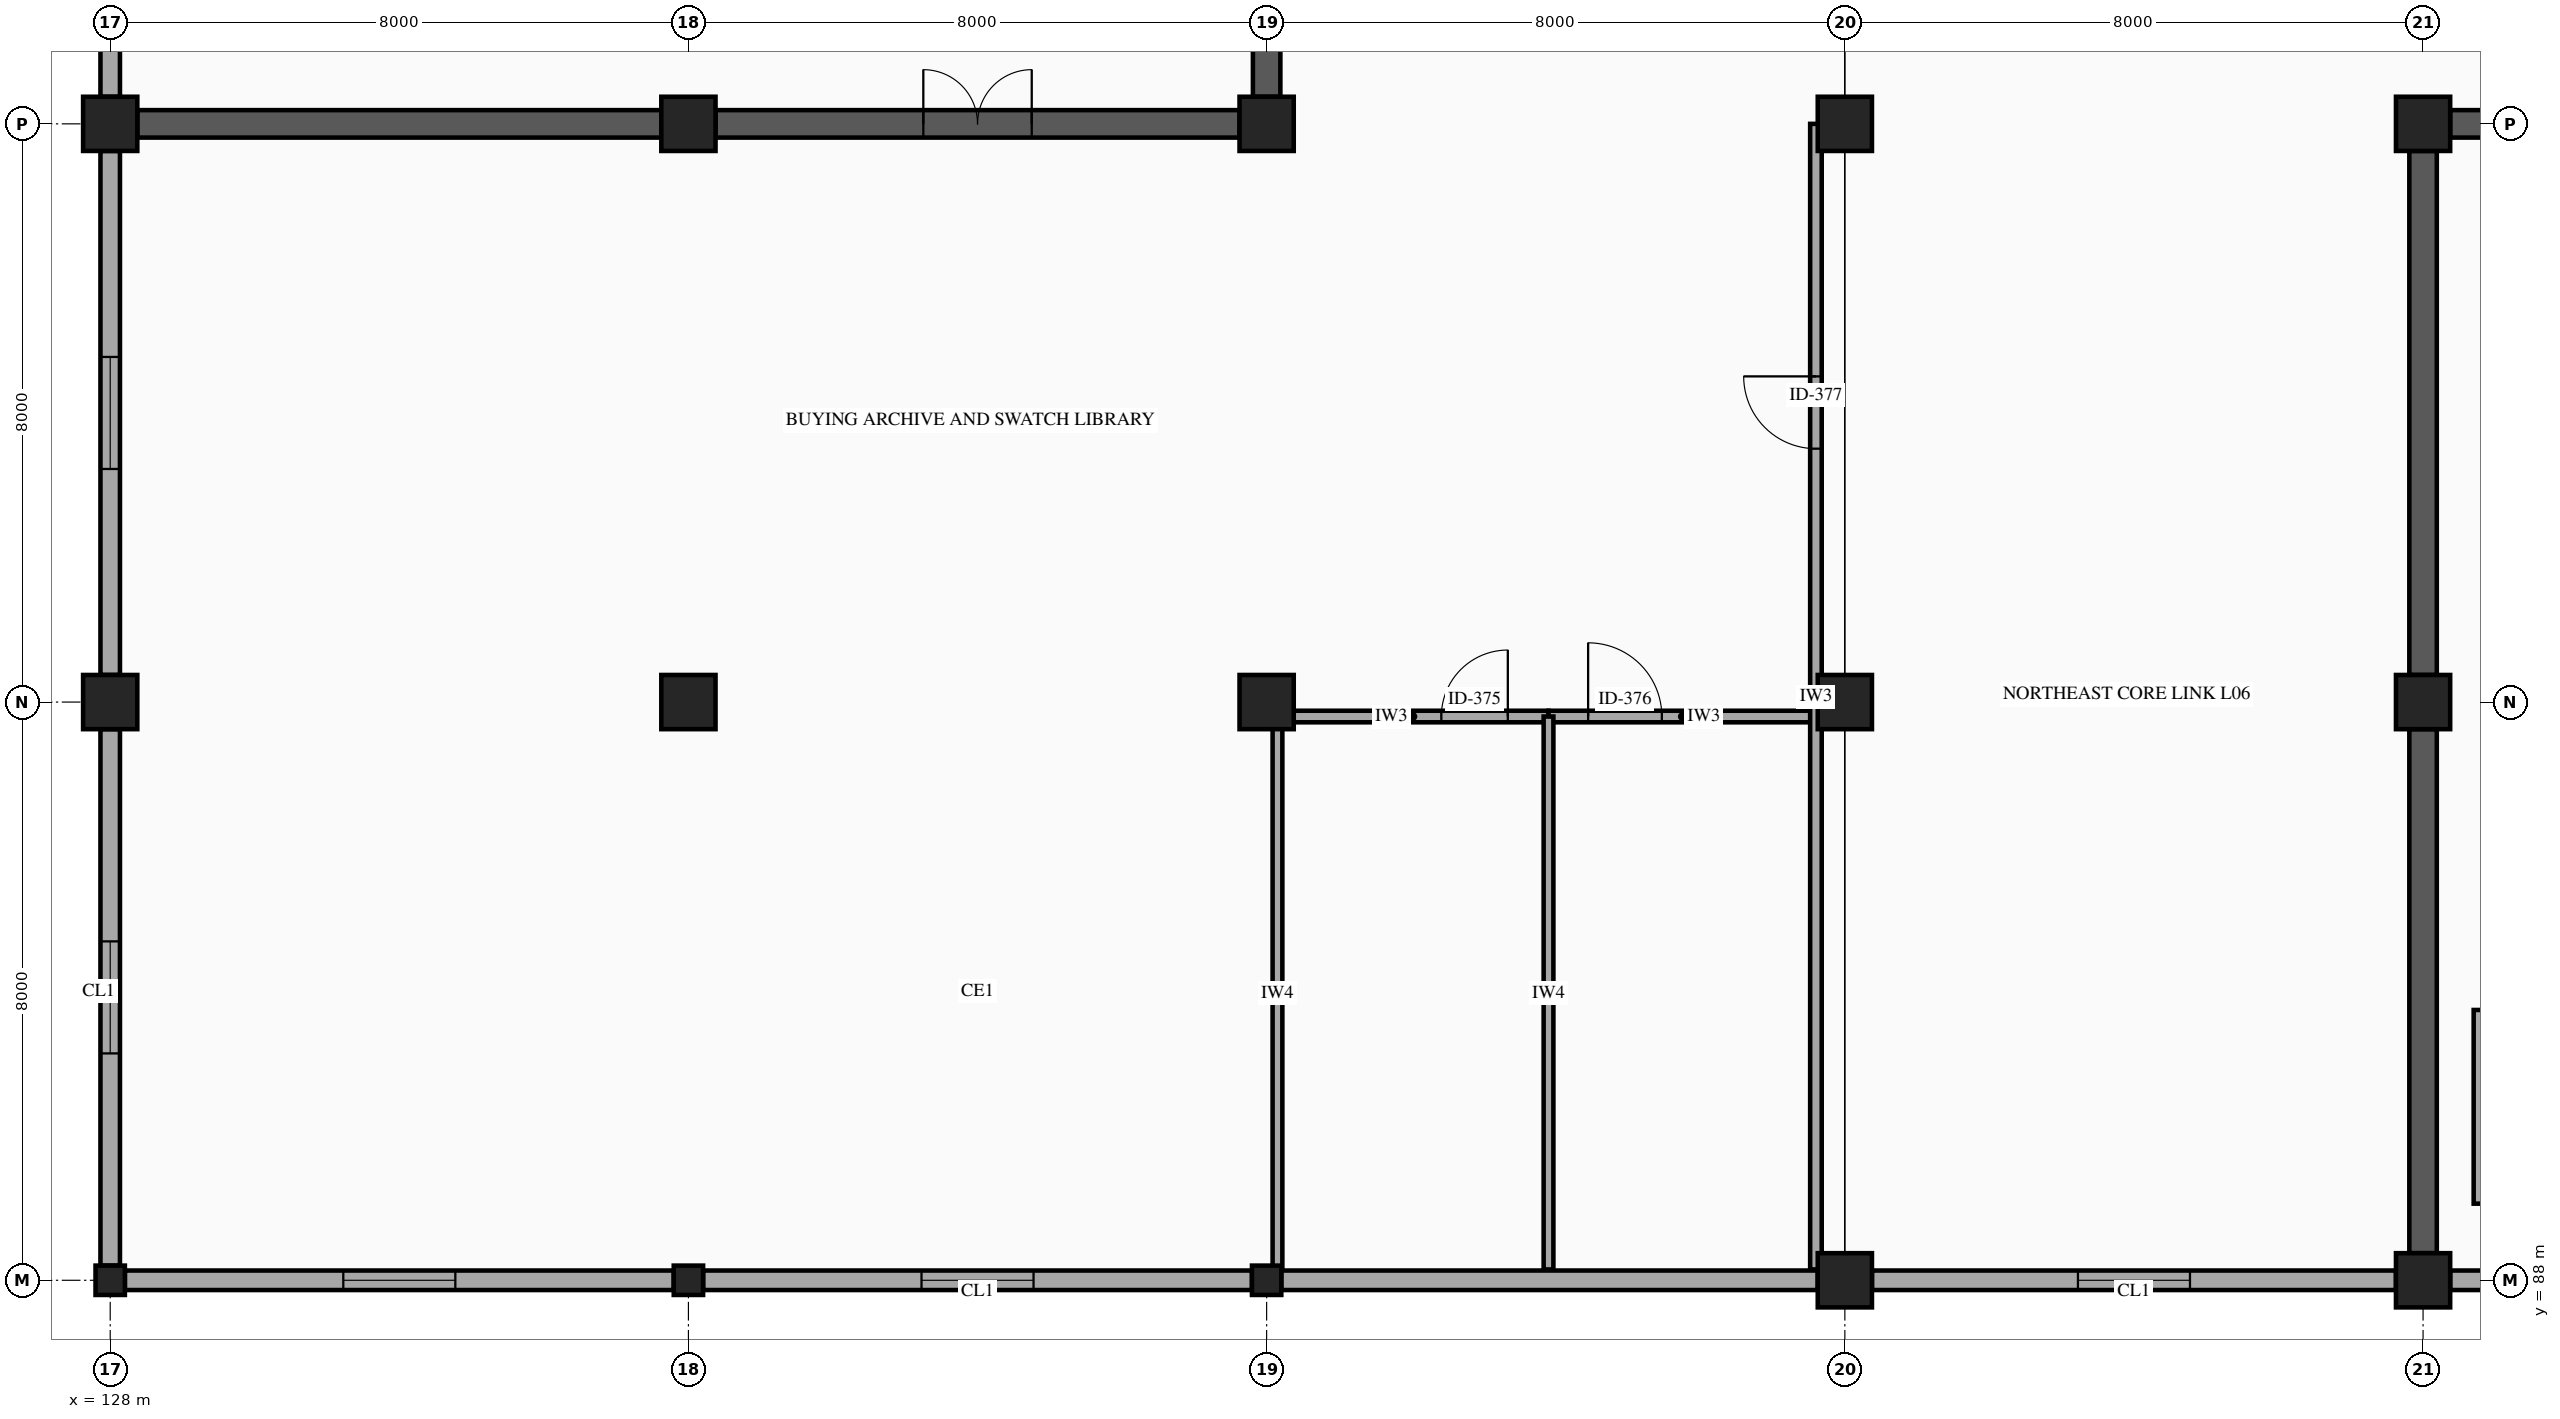
"""IFC4 building model, lengths in metres.
Left out: names, types, materials, properties, quantities, classifications, styles, units other than length and angle.
Written with IfcOpenShell. Run it as: python <this file> out.ifc"""

import sys

from ifc_helpers import new_model, si_unit, direction, frame, frame_2d, origin, origin_2d, place, context, subcontext, project, spatial, rectangle, hollow_circle, extrude, element, fill, save


model = new_model("IFC4")
c1 = context("Model", 3, precision=1e-05, world=origin(), true_north=direction((0.0, 1.0)))
c2 = subcontext(c1, "Body", "Model", "MODEL_VIEW")
j1 = project(units=[si_unit("LENGTHUNIT", "METRE"), si_unit("PLANEANGLEUNIT", "RADIAN")], contexts=[c1])
p1 = place(None, origin())
s1 = spatial("IfcSite", under=j1, at=p1, CompositionType="ELEMENT")
p2 = place(p1, origin())
s2 = spatial("IfcBuilding", under=s1, at=p2, CompositionType="ELEMENT")
p3 = place(p2, frame((0.0, 0.0, 28.4)))
s3 = spatial("IfcBuildingStorey", under=s2, at=p3, CompositionType="ELEMENT", Elevation=28.4)
p4 = place(p3, frame((128.0, 88.0, 0.0), z_axis=(0.0, 0.0, 1.0), x_axis=(1.0, 0.0, 0.0)))
e1 = element("IfcColumn", 1, at=p4, inside=s3, PredefinedType="COLUMN", context=c2, shape_type="SweptSolid", body=[
    extrude(hollow_circle(Radius=0.203, WallThickness=0.012, at=origin_2d()), origin(), (0.0, 0.0, 1.0), 4.5),
])
for number, where, z_axis, x_axis in (
    (2, (128.0, 96.0, 0.0), (0.0, 0.0, 1.0), (1.0, 0.0, 0.0)),
    (3, (128.0, 104.0, 0.0), (0.0, 0.0, 1.0), (1.0, 0.0, 0.0)),
):
    element("IfcColumn", number, at=place(p3, frame(where, z_axis=z_axis, x_axis=x_axis)), inside=s3, PredefinedType="COLUMN", context=c2, shape_type="SweptSolid", body=[
        extrude(rectangle(XDim=0.75, YDim=0.75, at=origin_2d()), origin(), (0.0, 0.0, 1.0), 4.5),
    ])
p5 = place(p3, frame((136.0, 88.0, 0.0), z_axis=(0.0, 0.0, 1.0), x_axis=(1.0, 0.0, 0.0)))
e4 = element("IfcColumn", 4, at=p5, inside=s3, PredefinedType="COLUMN", context=c2, shape_type="SweptSolid", body=[
    extrude(hollow_circle(Radius=0.203, WallThickness=0.012, at=origin_2d()), origin(), (0.0, 0.0, 1.0), 4.5),
])
for number, where, z_axis, x_axis in (
    (5, (136.0, 96.0, 0.0), (0.0, 0.0, 1.0), (1.0, 0.0, 0.0)),
    (6, (136.0, 104.0, 0.0), (0.0, 0.0, 1.0), (1.0, 0.0, 0.0)),
):
    element("IfcColumn", number, at=place(p3, frame(where, z_axis=z_axis, x_axis=x_axis)), inside=s3, PredefinedType="COLUMN", context=c2, shape_type="SweptSolid", body=[
        extrude(rectangle(XDim=0.75, YDim=0.75, at=origin_2d()), origin(), (0.0, 0.0, 1.0), 4.5),
    ])
p6 = place(p3, frame((144.0, 88.0, 0.0), z_axis=(0.0, 0.0, 1.0), x_axis=(1.0, 0.0, 0.0)))
e7 = element("IfcColumn", 7, at=p6, inside=s3, PredefinedType="COLUMN", context=c2, shape_type="SweptSolid", body=[
    extrude(hollow_circle(Radius=0.203, WallThickness=0.012, at=origin_2d()), origin(), (0.0, 0.0, 1.0), 4.5),
])
for number, where, z_axis, x_axis in (
    (8, (144.0, 96.0, 0.0), (0.0, 0.0, 1.0), (1.0, 0.0, 0.0)),
    (9, (144.0, 104.0, 0.0), (0.0, 0.0, 1.0), (1.0, 0.0, 0.0)),
    (10, (152.0, 88.0, 0.0), (0.0, 0.0, 1.0), (1.0, 0.0, 0.0)),
    (11, (152.0, 96.0, 0.0), (0.0, 0.0, 1.0), (1.0, 0.0, 0.0)),
    (12, (152.0, 104.0, 0.0), (0.0, 0.0, 1.0), (1.0, 0.0, 0.0)),
    (13, (160.0, 88.0, 0.0), (0.0, 0.0, 1.0), (1.0, 0.0, 0.0)),
    (14, (160.0, 96.0, 0.0), (0.0, 0.0, 1.0), (1.0, 0.0, 0.0)),
    (15, (160.0, 104.0, 0.0), (0.0, 0.0, 1.0), (1.0, 0.0, 0.0)),
):
    element("IfcColumn", number, at=place(p3, frame(where, z_axis=z_axis, x_axis=x_axis)), inside=s3, PredefinedType="COLUMN", context=c2, shape_type="SweptSolid", body=[
        extrude(rectangle(XDim=0.75, YDim=0.75, at=origin_2d()), origin(), (0.0, 0.0, 1.0), 4.5),
    ])
p7 = place(p3, frame((167.625, 88.0, 0.0), z_axis=(0.0, 0.0, 1.0), x_axis=(-1.0, 0.0, 0.0)))
e16 = element("IfcWall", 16, at=p7, inside=s3, PredefinedType="STANDARD", context=c2, shape_type="SweptSolid", body=[
    extrude(rectangle(XDim=7.25, YDim=0.27, at=frame_2d((3.625, 0.0))), origin(), (0.0, 0.0, 1.0), 3.48),
])
p8 = place(p3, frame((159.625, 88.0, 0.0), z_axis=(0.0, 0.0, 1.0), x_axis=(-1.0, 0.0, 0.0)))
e17 = element("IfcWall", 17, at=p8, inside=s3, PredefinedType="STANDARD", context=c2, shape_type="SweptSolid", body=[
    extrude(rectangle(XDim=7.25, YDim=0.27, at=frame_2d((3.625, 0.0))), origin(), (0.0, 0.0, 1.0), 3.48),
])
p9 = place(p8, frame((2.85, 0.0, 0.8)))
e18 = element("IfcOpeningElement", 18, at=p9, cuts=e17, PredefinedType="OPENING", context=c2, shape_type="SweptSolid", body=[
    extrude(rectangle(XDim=1.55, YDim=1.4, at=frame_2d((0.775, 0.7))), frame((0.0, 0.145, 0.0), z_axis=(0.0, -1.0, 0.0), x_axis=(1.0, 0.0, 0.0)), (0.0, 0.0, 1.0), 0.29),
])
p10 = place(p3, frame((151.625, 88.0, 0.0), z_axis=(0.0, 0.0, 1.0), x_axis=(-1.0, 0.0, 0.0)))
e19 = element("IfcWall", 19, at=p10, inside=s3, PredefinedType="STANDARD", context=c2, shape_type="SweptSolid", body=[
    extrude(rectangle(XDim=7.422, YDim=0.27, at=frame_2d((3.711, 0.0))), origin(), (0.0, 0.0, 1.0), 3.48),
])
p11 = place(p3, frame((143.797, 88.0, 0.0), z_axis=(0.0, 0.0, 1.0), x_axis=(-1.0, 0.0, 0.0)))
e20 = element("IfcWall", 20, at=p11, inside=s3, PredefinedType="STANDARD", context=c2, shape_type="SweptSolid", body=[
    extrude(rectangle(XDim=7.594, YDim=0.27, at=frame_2d((3.797, 0.0))), origin(), (0.0, 0.0, 1.0), 3.48),
])
p12 = place(p11, frame((3.022, 0.0, 0.8)))
e21 = element("IfcOpeningElement", 21, at=p12, cuts=e20, PredefinedType="OPENING", context=c2, shape_type="SweptSolid", body=[
    extrude(rectangle(XDim=1.55, YDim=1.4, at=frame_2d((0.775, 0.7))), frame((0.0, 0.145, 0.0), z_axis=(0.0, -1.0, 0.0), x_axis=(1.0, 0.0, 0.0)), (0.0, 0.0, 1.0), 0.29),
])
p13 = place(p3, frame((135.797, 88.0, 0.0), z_axis=(0.0, 0.0, 1.0), x_axis=(-1.0, 0.0, 0.0)))
e22 = element("IfcWall", 22, at=p13, inside=s3, PredefinedType="STANDARD", context=c2, shape_type="SweptSolid", body=[
    extrude(rectangle(XDim=7.594, YDim=0.27, at=frame_2d((3.797, 0.0))), origin(), (0.0, 0.0, 1.0), 3.48),
])
p14 = place(p13, frame((3.022, 0.0, 0.8)))
e23 = element("IfcOpeningElement", 23, at=p14, cuts=e22, PredefinedType="OPENING", context=c2, shape_type="SweptSolid", body=[
    extrude(rectangle(XDim=1.55, YDim=1.4, at=frame_2d((0.775, 0.7))), frame((0.0, 0.145, 0.0), z_axis=(0.0, -1.0, 0.0), x_axis=(1.0, 0.0, 0.0)), (0.0, 0.0, 1.0), 0.29),
])
p15 = place(p3, frame((128.0, 88.203, 0.0), z_axis=(0.0, 0.0, 1.0), x_axis=(0.0, 1.0, 0.0)))
e24 = element("IfcWall", 24, at=p15, inside=s3, PredefinedType="STANDARD", context=c2, shape_type="SweptSolid", body=[
    extrude(rectangle(XDim=7.422, YDim=0.27, at=frame_2d((3.711, 0.0))), origin(), (0.0, 0.0, 1.0), 3.48),
])
p16 = place(p15, frame((2.936, 0.0, 0.8)))
e25 = element("IfcOpeningElement", 25, at=p16, cuts=e24, PredefinedType="OPENING", context=c2, shape_type="SweptSolid", body=[
    extrude(rectangle(XDim=1.55, YDim=1.4, at=frame_2d((0.775, 0.7))), frame((0.0, 0.145, 0.0), z_axis=(0.0, -1.0, 0.0), x_axis=(1.0, 0.0, 0.0)), (0.0, 0.0, 1.0), 0.29),
])
p17 = place(p3, frame((128.0, 96.375, 0.0), z_axis=(0.0, 0.0, 1.0), x_axis=(0.0, 1.0, 0.0)))
e26 = element("IfcWall", 26, at=p17, inside=s3, PredefinedType="STANDARD", context=c2, shape_type="SweptSolid", body=[
    extrude(rectangle(XDim=7.25, YDim=0.27, at=frame_2d((3.625, 0.0))), origin(), (0.0, 0.0, 1.0), 3.48),
])
p18 = place(p17, frame((2.85, 0.0, 0.8)))
e27 = element("IfcOpeningElement", 27, at=p18, cuts=e26, PredefinedType="OPENING", context=c2, shape_type="SweptSolid", body=[
    extrude(rectangle(XDim=1.55, YDim=1.4, at=frame_2d((0.775, 0.7))), frame((0.0, 0.145, 0.0), z_axis=(0.0, -1.0, 0.0), x_axis=(1.0, 0.0, 0.0)), (0.0, 0.0, 1.0), 0.29),
])
p19 = place(p3, frame((128.0, 104.375, 0.0), z_axis=(0.0, 0.0, 1.0), x_axis=(0.0, 1.0, 0.0)))
e28 = element("IfcWall", 28, at=p19, inside=s3, PredefinedType="STANDARD", context=c2, shape_type="SweptSolid", body=[
    extrude(rectangle(XDim=7.25, YDim=0.27, at=frame_2d((3.625, 0.0))), origin(), (0.0, 0.0, 1.0), 3.48),
])
p20 = place(p3, frame((128.375, 104.0, 0.0), z_axis=(0.0, 0.0, 1.0), x_axis=(1.0, 0.0, 0.0)))
e29 = element("IfcWall", 29, at=p20, inside=s3, PredefinedType="SHEAR", context=c2, shape_type="SweptSolid", body=[
    extrude(rectangle(XDim=7.25, YDim=0.38, at=frame_2d((3.625, 0.0))), origin(), (0.0, 0.0, 1.0), 4.28),
])
p21 = place(p3, frame((136.375, 104.0, 0.0), z_axis=(0.0, 0.0, 1.0), x_axis=(1.0, 0.0, 0.0)))
e30 = element("IfcWall", 30, at=p21, inside=s3, PredefinedType="SHEAR", context=c2, shape_type="SweptSolid", body=[
    extrude(rectangle(XDim=7.25, YDim=0.38, at=frame_2d((3.625, 0.0))), origin(), (0.0, 0.0, 1.0), 4.28),
])
p22 = place(p21, frame((2.875, 0.0, 0.0)))
e31 = element("IfcOpeningElement", 31, at=p22, cuts=e30, PredefinedType="OPENING", context=c2, shape_type="SweptSolid", body=[
    extrude(rectangle(XDim=1.5, YDim=2.15, at=frame_2d((0.75, 1.075))), frame((0.0, 0.2, 0.0), z_axis=(0.0, -1.0, 0.0), x_axis=(1.0, 0.0, 0.0)), (0.0, 0.0, 1.0), 0.4),
])
p23 = place(p3, frame((144.0, 104.375, 0.0), z_axis=(0.0, 0.0, 1.0), x_axis=(0.0, 1.0, 0.0)))
e32 = element("IfcWall", 32, at=p23, inside=s3, PredefinedType="SHEAR", context=c2, shape_type="SweptSolid", body=[
    extrude(rectangle(XDim=7.25, YDim=0.38, at=frame_2d((3.625, 0.0))), origin(), (0.0, 0.0, 1.0), 4.28),
])
p24 = place(p23, frame((1.838, 0.0, 0.0)))
e33 = element("IfcOpeningElement", 33, at=p24, cuts=e32, PredefinedType="OPENING", context=c2, shape_type="SweptSolid", body=[
    extrude(rectangle(XDim=1.5, YDim=2.15, at=frame_2d((0.75, 1.075))), frame((0.0, 0.2, 0.0), z_axis=(0.0, -1.0, 0.0), x_axis=(1.0, 0.0, 0.0)), (0.0, 0.0, 1.0), 0.4),
])
for number, where, z_axis, x_axis in (
    (34, (160.375, 104.0, 0.0), (0.0, 0.0, 1.0), (1.0, 0.0, 0.0)),
    (35, (160.0, 88.375, 0.0), (0.0, 0.0, 1.0), (0.0, 1.0, 0.0)),
    (36, (160.0, 96.375, 0.0), (0.0, 0.0, 1.0), (0.0, 1.0, 0.0)),
):
    element("IfcWall", number, at=place(p3, frame(where, z_axis=z_axis, x_axis=x_axis)), inside=s3, PredefinedType="SHEAR", context=c2, shape_type="SweptSolid", body=[
        extrude(rectangle(XDim=7.25, YDim=0.38, at=frame_2d((3.625, 0.0))), origin(), (0.0, 0.0, 1.0), 4.28),
    ])
p25 = place(p3, frame((160.82, 89.06, 0.0), z_axis=(0.0, 0.0, 1.0), x_axis=(0.0, 1.0, 0.0)))
e37 = element("IfcWall", 37, at=p25, inside=s3, PredefinedType="PARTITIONING", context=c2, shape_type="SweptSolid", body=[
    extrude(rectangle(XDim=2.68, YDim=0.24, at=frame_2d((1.34, 0.0))), origin(), (0.0, 0.0, 1.0), 4.28),
])
p26 = place(p3, frame((144.15, 95.8, 0.0), z_axis=(0.0, 0.0, 1.0), x_axis=(1.0, 0.0, 0.0)))
e38 = element("IfcWall", 38, at=p26, inside=s3, PredefinedType="PARTITIONING", context=c2, shape_type="SweptSolid", body=[
    extrude(rectangle(XDim=3.75, YDim=0.16, at=frame_2d((1.875, 0.0))), origin(), (0.0, 0.0, 1.0), 3.48),
])
p27 = place(p26, frame((2.267, 0.0, 0.0)))
e39 = element("IfcOpeningElement", 39, at=p27, cuts=e38, PredefinedType="OPENING", context=c2, shape_type="SweptSolid", body=[
    extrude(rectangle(XDim=0.92, YDim=2.1, at=frame_2d((0.46, 1.05))), frame((0.0, 0.09, 0.0), z_axis=(0.0, -1.0, 0.0), x_axis=(1.0, 0.0, 0.0)), (0.0, 0.0, 1.0), 0.18),
])
p28 = place(p3, frame((147.9, 95.8, 0.0), z_axis=(0.0, 0.0, 1.0), x_axis=(1.0, 0.0, 0.0)))
e40 = element("IfcWall", 40, at=p28, inside=s3, PredefinedType="PARTITIONING", context=c2, shape_type="SweptSolid", body=[
    extrude(rectangle(XDim=3.7, YDim=0.16, at=frame_2d((1.85, 0.0))), origin(), (0.0, 0.0, 1.0), 3.48),
])
p29 = place(p28, frame((0.548, 0.0, 0.0)))
e41 = element("IfcOpeningElement", 41, at=p29, cuts=e40, PredefinedType="OPENING", context=c2, shape_type="SweptSolid", body=[
    extrude(rectangle(XDim=1.02, YDim=2.1, at=frame_2d((0.51, 1.05))), frame((0.0, 0.09, 0.0), z_axis=(0.0, -1.0, 0.0), x_axis=(1.0, 0.0, 0.0)), (0.0, 0.0, 1.0), 0.18),
])
for number, where, z_axis, x_axis in (
    (42, (144.15, 88.15, 0.0), (0.0, 0.0, 1.0), (0.0, 1.0, 0.0)),
    (43, (147.9, 88.15, 0.0), (0.0, 0.0, 1.0), (0.0, 1.0, 0.0)),
):
    element("IfcWall", number, at=place(p3, frame(where, z_axis=z_axis, x_axis=x_axis)), inside=s3, PredefinedType="PARTITIONING", context=c2, shape_type="SweptSolid", body=[
        extrude(rectangle(XDim=7.65, YDim=0.135, at=frame_2d((3.825, 0.0))), origin(), (0.0, 0.0, 1.0), 3.48),
    ])
p30 = place(p3, frame((151.6, 88.15, 0.0), z_axis=(0.0, 0.0, 1.0), x_axis=(0.0, 1.0, 0.0)))
e44 = element("IfcWall", 44, at=p30, inside=s3, PredefinedType="PARTITIONING", context=c2, shape_type="SweptSolid", body=[
    extrude(rectangle(XDim=15.85, YDim=0.16, at=frame_2d((7.925, 0.0))), origin(), (0.0, 0.0, 1.0), 3.48),
])
p31 = place(p30, frame((11.356, 0.0, 0.0)))
e45 = element("IfcOpeningElement", 45, at=p31, cuts=e44, PredefinedType="OPENING", context=c2, shape_type="SweptSolid", body=[
    extrude(rectangle(XDim=1.0, YDim=2.15, at=frame_2d((0.5, 1.075))), frame((0.0, 0.09, 0.0), z_axis=(0.0, -1.0, 0.0), x_axis=(1.0, 0.0, 0.0)), (0.0, 0.0, 1.0), 0.18),
])
p32 = place(p9, origin())
e46 = element("IfcWindow", 46, at=p32, inside=s3, PartitioningType="SINGLE_PANEL", PredefinedType="WINDOW", context=c2, shape_type="SweptSolid", body=[
    extrude(rectangle(XDim=1.55, YDim=1.4, at=frame_2d((0.775, 0.7))), frame((0.0, 0.03, 0.0), z_axis=(0.0, -1.0, 0.0), x_axis=(1.0, 0.0, 0.0)), (0.0, 0.0, 1.0), 0.06),
])
fill(e18, e46)
p33 = place(p12, origin())
e47 = element("IfcWindow", 47, at=p33, inside=s3, PartitioningType="SINGLE_PANEL", PredefinedType="WINDOW", context=c2, shape_type="SweptSolid", body=[
    extrude(rectangle(XDim=1.55, YDim=1.4, at=frame_2d((0.775, 0.7))), frame((0.0, 0.03, 0.0), z_axis=(0.0, -1.0, 0.0), x_axis=(1.0, 0.0, 0.0)), (0.0, 0.0, 1.0), 0.06),
])
fill(e21, e47)
p34 = place(p14, origin())
e48 = element("IfcWindow", 48, at=p34, inside=s3, PartitioningType="SINGLE_PANEL", PredefinedType="WINDOW", context=c2, shape_type="SweptSolid", body=[
    extrude(rectangle(XDim=1.55, YDim=1.4, at=frame_2d((0.775, 0.7))), frame((0.0, 0.03, 0.0), z_axis=(0.0, -1.0, 0.0), x_axis=(1.0, 0.0, 0.0)), (0.0, 0.0, 1.0), 0.06),
])
fill(e23, e48)
p35 = place(p16, origin())
e49 = element("IfcWindow", 49, at=p35, inside=s3, PartitioningType="SINGLE_PANEL", PredefinedType="WINDOW", context=c2, shape_type="SweptSolid", body=[
    extrude(rectangle(XDim=1.55, YDim=1.4, at=frame_2d((0.775, 0.7))), frame((0.0, 0.03, 0.0), z_axis=(0.0, -1.0, 0.0), x_axis=(1.0, 0.0, 0.0)), (0.0, 0.0, 1.0), 0.06),
])
fill(e25, e49)
p36 = place(p18, origin())
e50 = element("IfcWindow", 50, at=p36, inside=s3, PartitioningType="SINGLE_PANEL", PredefinedType="WINDOW", context=c2, shape_type="SweptSolid", body=[
    extrude(rectangle(XDim=1.55, YDim=1.4, at=frame_2d((0.775, 0.7))), frame((0.0, 0.03, 0.0), z_axis=(0.0, -1.0, 0.0), x_axis=(1.0, 0.0, 0.0)), (0.0, 0.0, 1.0), 0.06),
])
fill(e27, e50)
p37 = place(p22, origin())
e51 = element("IfcDoor", 51, at=p37, inside=s3, OperationType="DOUBLE_DOOR_SINGLE_SWING", PredefinedType="DOOR", context=c2, shape_type="SweptSolid", body=[
    extrude(rectangle(XDim=1.5, YDim=2.15, at=frame_2d((0.75, 1.075))), frame((0.0, 0.025, 0.0), z_axis=(0.0, -1.0, 0.0), x_axis=(1.0, 0.0, 0.0)), (0.0, 0.0, 1.0), 0.05),
])
fill(e31, e51)
p38 = place(p27, origin())
e52 = element("IfcDoor", 52, at=p38, inside=s3, OperationType="SINGLE_SWING_RIGHT", PredefinedType="DOOR", context=c2, shape_type="SweptSolid", body=[
    extrude(rectangle(XDim=0.92, YDim=2.1, at=frame_2d((0.46, 1.05))), frame((0.0, 0.025, 0.0), z_axis=(0.0, -1.0, 0.0), x_axis=(1.0, 0.0, 0.0)), (0.0, 0.0, 1.0), 0.05),
])
fill(e39, e52)
p39 = place(p29, origin())
e53 = element("IfcDoor", 53, at=p39, inside=s3, OperationType="SINGLE_SWING_LEFT", PredefinedType="DOOR", context=c2, shape_type="SweptSolid", body=[
    extrude(rectangle(XDim=1.02, YDim=2.1, at=frame_2d((0.51, 1.05))), frame((0.0, 0.025, 0.0), z_axis=(0.0, -1.0, 0.0), x_axis=(1.0, 0.0, 0.0)), (0.0, 0.0, 1.0), 0.05),
])
fill(e41, e53)
p40 = place(p31, origin())
e54 = element("IfcDoor", 54, at=p40, inside=s3, OperationType="SINGLE_SWING_RIGHT", PredefinedType="DOOR", context=c2, shape_type="SweptSolid", body=[
    extrude(rectangle(XDim=1.0, YDim=2.15, at=frame_2d((0.5, 1.075))), frame((0.0, 0.025, 0.0), z_axis=(0.0, -1.0, 0.0), x_axis=(1.0, 0.0, 0.0)), (0.0, 0.0, 1.0), 0.05),
])
fill(e45, e54)
save(model, sys.argv[1])
